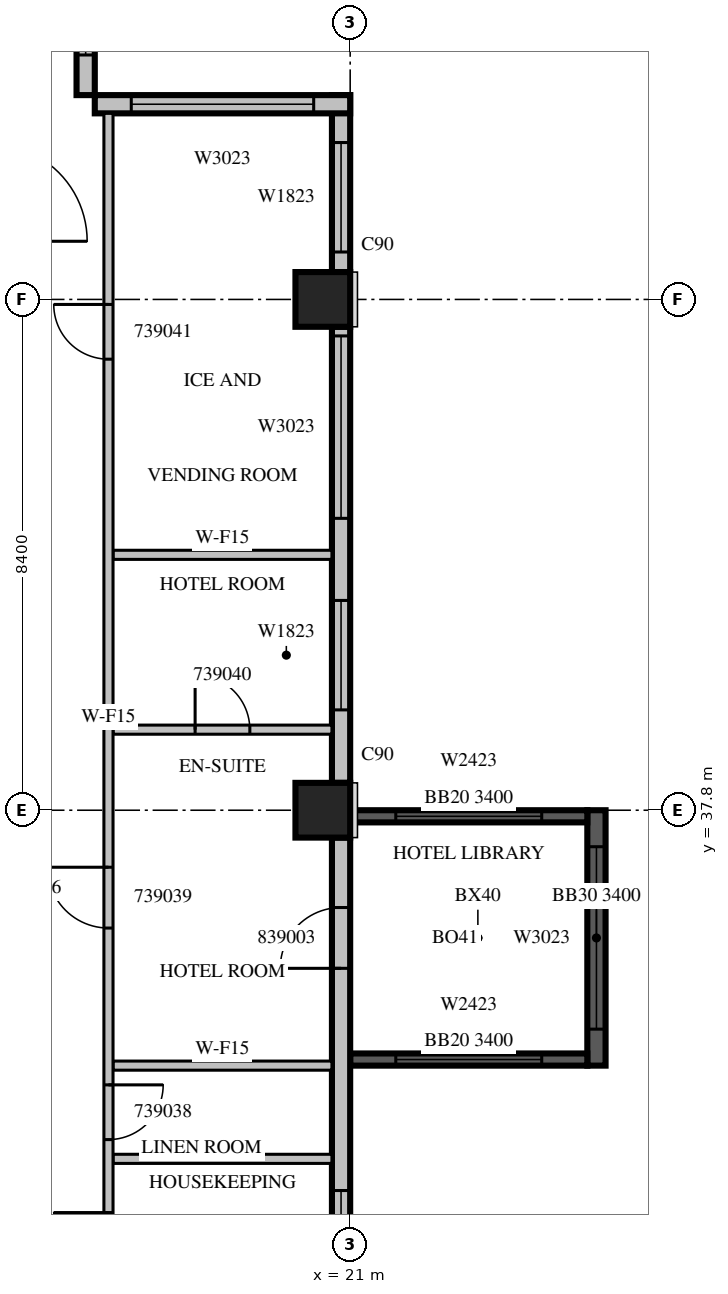
"""IFC4 building model, lengths in metres.
Left out: names, types, materials, properties, quantities, classifications, styles, units other than length and angle.
Written with IfcOpenShell. Run it as: python <this file> out.ifc"""

import sys

from ifc_helpers import new_model, si_unit, direction, frame, frame_2d, origin, origin_2d, place, context, subcontext, project, spatial, rectangle, extrude, source, transform, mapped, element, fill, save


model = new_model("IFC4")
c1 = context("Model", 3, precision=1e-05, world=origin(), true_north=direction((0.0, 1.0)))
c2 = subcontext(c1, "Body", "Model", "MODEL_VIEW")
j1 = project(units=[si_unit("LENGTHUNIT", "METRE"), si_unit("PLANEANGLEUNIT", "RADIAN")], contexts=[c1])
p1 = place(None, origin())
s1 = spatial("IfcSite", under=j1, at=p1, CompositionType="ELEMENT")
p2 = place(p1, origin())
s2 = spatial("IfcBuilding", under=s1, at=p2, CompositionType="ELEMENT")
p3 = place(p2, frame((0.0, 0.0, 181.6)))
s3 = spatial("IfcBuildingStorey", under=s2, at=p3, CompositionType="ELEMENT", Elevation=181.6)
m1 = source(origin(), c2, "Body", "SweptSolid", [
    extrude(rectangle(XDim=0.9, YDim=0.9, at=origin_2d()), origin(), (0.0, 0.0, 1.0), 3.8),
])
for number, where, z_axis, x_axis in (
    (1, (20.55, 37.8, 0.0), (0.0, 0.0, 1.0), (1.0, 0.0, 0.0)),
    (2, (20.55, 46.2, 0.0), (0.0, 0.0, 1.0), (1.0, 0.0, 0.0)),
):
    element("IfcColumn", number, at=place(p3, frame(where, z_axis=z_axis, x_axis=x_axis)), inside=s3, PredefinedType="COLUMN", context=c2, shape_type="MappedRepresentation", body=[
        mapped(m1, transform((0.0, 0.0, 0.0), scale=1.0)),
    ])
m2 = source(origin(), c2, "Body", "SweptSolid", [
    extrude(rectangle(XDim=4.2, YDim=0.3, at=frame_2d((2.1, 0.0))), origin(), (0.0, 0.0, 1.0), 3.4),
])
p4 = place(p3, frame((25.05, 33.6, 0.0), z_axis=(0.0, 0.0, 1.0), x_axis=(0.0, 1.0, 0.0)))
e3 = element("IfcWall", 3, at=p4, inside=s3, PredefinedType="SOLIDWALL", context=c2, shape_type="MappedRepresentation", body=[
    mapped(m2, transform((0.0, 0.0, 0.0), scale=1.0)),
])
m3 = source(origin(), c2, "Body", "SweptSolid", [
    extrude(rectangle(XDim=3.0, YDim=2.3, at=frame_2d((1.5, 1.15))), frame((0.0, 0.16, 0.0), z_axis=(0.0, -1.0, 0.0), x_axis=(1.0, 0.0, 0.0)), (0.0, 0.0, 1.0), 0.32),
])
p5 = place(p4, frame((0.6, 0.0, 0.6)))
e4 = element("IfcOpeningElement", 4, at=p5, cuts=e3, PredefinedType="OPENING", context=c2, shape_type="MappedRepresentation", body=[
    mapped(m3, transform((0.0, 0.0, 0.0), scale=1.0)),
])
m4 = source(origin(), c2, "Body", "SweptSolid", [
    extrude(rectangle(XDim=3.9, YDim=0.2, at=frame_2d((1.95, 0.0))), origin(), (0.0, 0.0, 1.0), 3.4),
])
p6 = place(p3, frame((21.0, 33.7, 0.0), z_axis=(0.0, 0.0, 1.0), x_axis=(1.0, 0.0, 0.0)))
e5 = element("IfcWall", 5, at=p6, inside=s3, PredefinedType="SOLIDWALL", context=c2, shape_type="MappedRepresentation", body=[
    mapped(m4, transform((0.0, 0.0, 0.0), scale=1.0)),
])
m5 = source(origin(), c2, "Body", "SweptSolid", [
    extrude(rectangle(XDim=2.4, YDim=2.3, at=frame_2d((1.2, 1.15))), frame((0.0, 0.11, 0.0), z_axis=(0.0, -1.0, 0.0), x_axis=(1.0, 0.0, 0.0)), (0.0, 0.0, 1.0), 0.22),
])
p7 = place(p6, frame((0.75, 0.0, 0.6)))
e6 = element("IfcOpeningElement", 6, at=p7, cuts=e5, PredefinedType="OPENING", context=c2, shape_type="MappedRepresentation", body=[
    mapped(m5, transform((0.0, 0.0, 0.0), scale=1.0)),
])
p8 = place(p3, frame((21.0, 37.7, 0.0), z_axis=(0.0, 0.0, 1.0), x_axis=(1.0, 0.0, 0.0)))
e7 = element("IfcWall", 7, at=p8, inside=s3, PredefinedType="SOLIDWALL", context=c2, shape_type="MappedRepresentation", body=[
    mapped(m4, transform((0.0, 0.0, 0.0), scale=1.0)),
])
p9 = place(p8, frame((0.75, 0.0, 0.6)))
e8 = element("IfcOpeningElement", 8, at=p9, cuts=e7, PredefinedType="OPENING", context=c2, shape_type="MappedRepresentation", body=[
    mapped(m5, transform((0.0, 0.0, 0.0), scale=1.0)),
])
m6 = source(origin(), c2, "Body", "SweptSolid", [
    extrude(rectangle(XDim=7.5, YDim=0.3, at=frame_2d((3.75, 0.0))), origin(), (0.0, 0.0, 1.0), 3.4),
])
p10 = place(p3, frame((20.85, 29.85, 0.0), z_axis=(0.0, 0.0, 1.0), x_axis=(0.0, 1.0, 0.0)))
e9 = element("IfcWall", 9, at=p10, inside=s3, PredefinedType="STANDARD", context=c2, shape_type="MappedRepresentation", body=[
    mapped(m6, transform((0.0, 0.0, 0.0), scale=1.0)),
])
m7 = source(origin(), c2, "Body", "SweptSolid", [
    extrude(rectangle(XDim=1.2, YDim=2.3, at=frame_2d((0.6, 1.15))), frame((0.0, 0.16, 0.0), z_axis=(0.0, -1.0, 0.0), x_axis=(1.0, 0.0, 0.0)), (0.0, 0.0, 1.0), 0.32),
])
p11 = place(p10, frame((0.496, 0.0, 0.6)))
e10 = element("IfcOpeningElement", 10, at=p11, cuts=e9, PredefinedType="OPENING", context=c2, shape_type="MappedRepresentation", body=[
    mapped(m7, transform((0.0, 0.0, 0.0), scale=1.0)),
])
m8 = source(origin(), c2, "Body", "SweptSolid", [
    extrude(rectangle(XDim=1.0, YDim=2.1, at=frame_2d((0.5, 1.05))), frame((0.0, 0.16, 0.0), z_axis=(0.0, -1.0, 0.0), x_axis=(1.0, 0.0, 0.0)), (0.0, 0.0, 1.0), 0.32),
])
p12 = place(p10, frame((5.35, 0.0, 0.0)))
e11 = element("IfcOpeningElement", 11, at=p12, cuts=e9, PredefinedType="OPENING", context=c2, shape_type="MappedRepresentation", body=[
    mapped(m8, transform((0.0, 0.0, 0.0), scale=1.0)),
])
p13 = place(p3, frame((20.85, 38.25, 0.0), z_axis=(0.0, 0.0, 1.0), x_axis=(0.0, 1.0, 0.0)))
e12 = element("IfcWall", 12, at=p13, inside=s3, PredefinedType="STANDARD", context=c2, shape_type="MappedRepresentation", body=[
    mapped(m6, transform((0.0, 0.0, 0.0), scale=1.0)),
])
m9 = source(origin(), c2, "Body", "SweptSolid", [
    extrude(rectangle(XDim=1.8, YDim=2.3, at=frame_2d((0.9, 1.15))), frame((0.0, 0.16, 0.0), z_axis=(0.0, -1.0, 0.0), x_axis=(1.0, 0.0, 0.0)), (0.0, 0.0, 1.0), 0.32),
])
p14 = place(p13, frame((1.2, 0.0, 0.6)))
e13 = element("IfcOpeningElement", 13, at=p14, cuts=e12, PredefinedType="OPENING", context=c2, shape_type="MappedRepresentation", body=[
    mapped(m9, transform((0.0, 0.0, 0.0), scale=1.0)),
])
p15 = place(p13, frame((4.35, 0.0, 0.6)))
e14 = element("IfcOpeningElement", 14, at=p15, cuts=e12, PredefinedType="OPENING", context=c2, shape_type="MappedRepresentation", body=[
    mapped(m3, transform((0.0, 0.0, 0.0), scale=1.0)),
])
m10 = source(origin(), c2, "Body", "SweptSolid", [
    extrude(rectangle(XDim=2.91, YDim=0.3, at=frame_2d((1.455, 0.0))), origin(), (0.0, 0.0, 1.0), 3.4),
])
p16 = place(p3, frame((20.85, 46.65, 0.0), z_axis=(0.0, 0.0, 1.0), x_axis=(0.0, 1.0, 0.0)))
e15 = element("IfcWall", 15, at=p16, inside=s3, PredefinedType="STANDARD", context=c2, shape_type="MappedRepresentation", body=[
    mapped(m10, transform((0.0, 0.0, 0.0), scale=1.0)),
])
p17 = place(p16, frame((0.33, 0.0, 0.6)))
e16 = element("IfcOpeningElement", 16, at=p17, cuts=e15, PredefinedType="OPENING", context=c2, shape_type="MappedRepresentation", body=[
    mapped(m9, transform((0.0, 0.0, 0.0), scale=1.0)),
])
m11 = source(origin(), c2, "Body", "SweptSolid", [
    extrude(rectangle(XDim=4.2, YDim=0.3, at=frame_2d((2.1, 0.0))), origin(), (0.0, 0.0, 1.0), 3.4),
])
p18 = place(p3, frame((21.0, 49.41, 0.0), z_axis=(0.0, 0.0, 1.0), x_axis=(-1.0, 0.0, 0.0)))
e17 = element("IfcWall", 17, at=p18, inside=s3, PredefinedType="STANDARD", context=c2, shape_type="MappedRepresentation", body=[
    mapped(m11, transform((0.0, 0.0, 0.0), scale=1.0)),
])
p19 = place(p18, frame((0.6, 0.0, 0.6)))
e18 = element("IfcOpeningElement", 18, at=p19, cuts=e17, PredefinedType="OPENING", context=c2, shape_type="MappedRepresentation", body=[
    mapped(m3, transform((0.0, 0.0, 0.0), scale=1.0)),
])
m12 = source(origin(), c2, "Body", "SweptSolid", [
    extrude(rectangle(XDim=2.52, YDim=0.3, at=frame_2d((1.26, 0.0))), origin(), (0.0, 0.0, 1.0), 3.4),
])
p20 = place(p3, frame((16.65, 49.56, 0.0), z_axis=(0.0, 0.0, 1.0), x_axis=(0.0, 1.0, 0.0)))
e19 = element("IfcWall", 19, at=p20, inside=s3, PredefinedType="STANDARD", context=c2, shape_type="MappedRepresentation", body=[
    mapped(m12, transform((0.0, 0.0, 0.0), scale=1.0)),
])
p21 = place(p20, frame((0.66, 0.0, 0.6)))
e20 = element("IfcOpeningElement", 20, at=p21, cuts=e19, PredefinedType="OPENING", context=c2, shape_type="MappedRepresentation", body=[
    mapped(m7, transform((0.0, 0.0, 0.0), scale=1.0)),
])
m13 = source(origin(), c2, "Body", "SweptSolid", [
    extrude(rectangle(XDim=3.6, YDim=0.15, at=frame_2d((1.8, 0.0))), origin(), (0.0, 0.0, 1.0), 3.4),
])
p22 = place(p3, frame((17.1, 32.067, 0.0), z_axis=(0.0, 0.0, 1.0), x_axis=(1.0, 0.0, 0.0)))
e21 = element("IfcWall", 21, at=p22, inside=s3, PredefinedType="PARTITIONING", context=c2, shape_type="MappedRepresentation", body=[
    mapped(m13, transform((0.0, 0.0, 0.0), scale=1.0)),
])
p23 = place(p3, frame((17.1, 39.125, 0.0), z_axis=(0.0, 0.0, 1.0), x_axis=(1.0, 0.0, 0.0)))
e22 = element("IfcWall", 22, at=p23, inside=s3, PredefinedType="PARTITIONING", context=c2, shape_type="MappedRepresentation", body=[
    mapped(m13, transform((0.0, 0.0, 0.0), scale=1.0)),
])
m14 = source(origin(), c2, "Body", "SweptSolid", [
    extrude(rectangle(XDim=0.9, YDim=2.1, at=frame_2d((0.45, 1.05))), frame((0.0, 0.085, 0.0), z_axis=(0.0, -1.0, 0.0), x_axis=(1.0, 0.0, 0.0)), (0.0, 0.0, 1.0), 0.17),
])
p24 = place(p23, frame((1.35, 0.0, 0.0)))
e23 = element("IfcOpeningElement", 23, at=p24, cuts=e22, PredefinedType="OPENING", context=c2, shape_type="MappedRepresentation", body=[
    mapped(m14, transform((0.0, 0.0, 0.0), scale=1.0)),
])
for number, where, z_axis, x_axis in (
    (24, (20.7, 33.6, 0.0), (0.0, 0.0, 1.0), (-1.0, 0.0, 0.0)),
    (25, (20.7, 42.0, 0.0), (0.0, 0.0, 1.0), (-1.0, 0.0, 0.0)),
):
    element("IfcWall", number, at=place(p3, frame(where, z_axis=z_axis, x_axis=x_axis)), inside=s3, PredefinedType="PARTITIONING", context=c2, shape_type="MappedRepresentation", body=[
        mapped(m13, transform((0.0, 0.0, 0.0), scale=1.0)),
    ])
m15 = source(origin(), c2, "Body", "SweptSolid", [
    extrude(rectangle(XDim=19.86, YDim=0.15, at=frame_2d((9.93, 0.0))), origin(), (0.0, 0.0, 1.0), 3.4),
])
p25 = place(p3, frame((17.025, 49.26, 0.0), z_axis=(0.0, 0.0, 1.0), x_axis=(0.0, -1.0, 0.0)))
e26 = element("IfcWall", 26, at=p25, inside=s3, PredefinedType="PARTITIONING", context=c2, shape_type="MappedRepresentation", body=[
    mapped(m15, transform((0.0, 0.0, 0.0), scale=1.0)),
])
p26 = place(p25, frame((18.076, 0.0, 0.0)))
e27 = element("IfcOpeningElement", 27, at=p26, cuts=e26, PredefinedType="OPENING", context=c2, shape_type="MappedRepresentation", body=[
    mapped(m14, transform((0.0, 0.0, 0.0), scale=1.0)),
])
p27 = place(p25, frame((15.976, 0.0, 0.0)))
e28 = element("IfcOpeningElement", 28, at=p27, cuts=e26, PredefinedType="OPENING", context=c2, shape_type="MappedRepresentation", body=[
    mapped(m14, transform((0.0, 0.0, 0.0), scale=1.0)),
])
m16 = source(origin(), c2, "Body", "SweptSolid", [
    extrude(rectangle(XDim=1.0, YDim=2.1, at=frame_2d((0.5, 1.05))), frame((0.0, 0.085, 0.0), z_axis=(0.0, -1.0, 0.0), x_axis=(1.0, 0.0, 0.0)), (0.0, 0.0, 1.0), 0.17),
])
p28 = place(p25, frame((12.398, 0.0, 0.0)))
e29 = element("IfcOpeningElement", 29, at=p28, cuts=e26, PredefinedType="OPENING", context=c2, shape_type="MappedRepresentation", body=[
    mapped(m16, transform((0.0, 0.0, 0.0), scale=1.0)),
])
p29 = place(p25, frame((3.143, 0.0, 0.0)))
e30 = element("IfcOpeningElement", 30, at=p29, cuts=e26, PredefinedType="OPENING", context=c2, shape_type="MappedRepresentation", body=[
    mapped(m14, transform((0.0, 0.0, 0.0), scale=1.0)),
])
m17 = source(origin(), c2, "Body", "SweptSolid", [
    extrude(rectangle(XDim=3.0, YDim=2.3, at=frame_2d((1.5, 1.15))), frame((0.0, 0.03, 0.0), z_axis=(0.0, -1.0, 0.0), x_axis=(1.0, 0.0, 0.0)), (0.0, 0.0, 1.0), 0.06),
])
p30 = place(p5, origin())
e31 = element("IfcWindow", 31, at=p30, inside=s3, PartitioningType="SINGLE_PANEL", PredefinedType="WINDOW", context=c2, shape_type="MappedRepresentation", body=[
    mapped(m17, transform((0.0, 0.0, 0.0), scale=1.0)),
])
fill(e4, e31)
m18 = source(origin(), c2, "Body", "SweptSolid", [
    extrude(rectangle(XDim=2.4, YDim=2.3, at=frame_2d((1.2, 1.15))), frame((0.0, 0.03, 0.0), z_axis=(0.0, -1.0, 0.0), x_axis=(1.0, 0.0, 0.0)), (0.0, 0.0, 1.0), 0.06),
])
p31 = place(p7, origin())
e32 = element("IfcWindow", 32, at=p31, inside=s3, PartitioningType="SINGLE_PANEL", PredefinedType="WINDOW", context=c2, shape_type="MappedRepresentation", body=[
    mapped(m18, transform((0.0, 0.0, 0.0), scale=1.0)),
])
fill(e6, e32)
p32 = place(p9, origin())
e33 = element("IfcWindow", 33, at=p32, inside=s3, PartitioningType="SINGLE_PANEL", PredefinedType="WINDOW", context=c2, shape_type="MappedRepresentation", body=[
    mapped(m18, transform((0.0, 0.0, 0.0), scale=1.0)),
])
fill(e8, e33)
m19 = source(origin(), c2, "Body", "SweptSolid", [
    extrude(rectangle(XDim=1.2, YDim=2.3, at=frame_2d((0.6, 1.15))), frame((0.0, 0.03, 0.0), z_axis=(0.0, -1.0, 0.0), x_axis=(1.0, 0.0, 0.0)), (0.0, 0.0, 1.0), 0.06),
])
p33 = place(p11, origin())
e34 = element("IfcWindow", 34, at=p33, inside=s3, PartitioningType="SINGLE_PANEL", PredefinedType="WINDOW", context=c2, shape_type="MappedRepresentation", body=[
    mapped(m19, transform((0.0, 0.0, 0.0), scale=1.0)),
])
fill(e10, e34)
m20 = source(origin(), c2, "Body", "SweptSolid", [
    extrude(rectangle(XDim=1.8, YDim=2.3, at=frame_2d((0.9, 1.15))), frame((0.0, 0.03, 0.0), z_axis=(0.0, -1.0, 0.0), x_axis=(1.0, 0.0, 0.0)), (0.0, 0.0, 1.0), 0.06),
])
p34 = place(p14, origin())
e35 = element("IfcWindow", 35, at=p34, inside=s3, PartitioningType="SINGLE_PANEL", PredefinedType="WINDOW", context=c2, shape_type="MappedRepresentation", body=[
    mapped(m20, transform((0.0, 0.0, 0.0), scale=1.0)),
])
fill(e13, e35)
p35 = place(p15, origin())
e36 = element("IfcWindow", 36, at=p35, inside=s3, PartitioningType="SINGLE_PANEL", PredefinedType="WINDOW", context=c2, shape_type="MappedRepresentation", body=[
    mapped(m17, transform((0.0, 0.0, 0.0), scale=1.0)),
])
fill(e14, e36)
p36 = place(p17, origin())
e37 = element("IfcWindow", 37, at=p36, inside=s3, PartitioningType="SINGLE_PANEL", PredefinedType="WINDOW", context=c2, shape_type="MappedRepresentation", body=[
    mapped(m20, transform((0.0, 0.0, 0.0), scale=1.0)),
])
fill(e16, e37)
p37 = place(p19, origin())
e38 = element("IfcWindow", 38, at=p37, inside=s3, PartitioningType="SINGLE_PANEL", PredefinedType="WINDOW", context=c2, shape_type="MappedRepresentation", body=[
    mapped(m17, transform((0.0, 0.0, 0.0), scale=1.0)),
])
fill(e18, e38)
p38 = place(p21, origin())
e39 = element("IfcWindow", 39, at=p38, inside=s3, PartitioningType="SINGLE_PANEL", PredefinedType="WINDOW", context=c2, shape_type="MappedRepresentation", body=[
    mapped(m19, transform((0.0, 0.0, 0.0), scale=1.0)),
])
fill(e20, e39)
m21 = source(origin(), c2, "Body", "SweptSolid", [
    extrude(rectangle(XDim=0.9, YDim=2.1, at=frame_2d((0.45, 1.05))), frame((0.0, 0.025, 0.0), z_axis=(0.0, -1.0, 0.0), x_axis=(1.0, 0.0, 0.0)), (0.0, 0.0, 1.0), 0.05),
])
p39 = place(p26, origin())
e40 = element("IfcDoor", 40, at=p39, inside=s3, OperationType="SINGLE_SWING_RIGHT", PredefinedType="DOOR", context=c2, shape_type="MappedRepresentation", body=[
    mapped(m21, transform((0.0, 0.0, 0.0), scale=1.0)),
])
fill(e27, e40)
p40 = place(p27, origin())
e41 = element("IfcDoor", 41, at=p40, inside=s3, OperationType="SINGLE_SWING_LEFT", PredefinedType="DOOR", context=c2, shape_type="MappedRepresentation", body=[
    mapped(m21, transform((0.0, 0.0, 0.0), scale=1.0)),
])
fill(e28, e41)
m22 = source(origin(), c2, "Body", "SweptSolid", [
    extrude(rectangle(XDim=1.0, YDim=2.1, at=frame_2d((0.5, 1.05))), frame((0.0, 0.025, 0.0), z_axis=(0.0, -1.0, 0.0), x_axis=(1.0, 0.0, 0.0)), (0.0, 0.0, 1.0), 0.05),
])
p41 = place(p28, origin())
e42 = element("IfcDoor", 42, at=p41, inside=s3, OperationType="SINGLE_SWING_RIGHT", PredefinedType="DOOR", context=c2, shape_type="MappedRepresentation", body=[
    mapped(m22, transform((0.0, 0.0, 0.0), scale=1.0)),
])
fill(e29, e42)
p42 = place(p24, origin())
e43 = element("IfcDoor", 43, at=p42, inside=s3, OperationType="SINGLE_SWING_LEFT", PredefinedType="DOOR", context=c2, shape_type="MappedRepresentation", body=[
    mapped(m21, transform((0.0, 0.0, 0.0), scale=1.0)),
])
fill(e23, e43)
p43 = place(p29, origin())
e44 = element("IfcDoor", 44, at=p43, inside=s3, OperationType="SINGLE_SWING_RIGHT", PredefinedType="DOOR", context=c2, shape_type="MappedRepresentation", body=[
    mapped(m21, transform((0.0, 0.0, 0.0), scale=1.0)),
])
fill(e30, e44)
p44 = place(p12, origin())
e45 = element("IfcDoor", 45, at=p44, inside=s3, OperationType="SINGLE_SWING_LEFT", PredefinedType="DOOR", context=c2, shape_type="MappedRepresentation", body=[
    mapped(m22, transform((0.0, 0.0, 0.0), scale=1.0)),
])
fill(e11, e45)
save(model, sys.argv[1])
